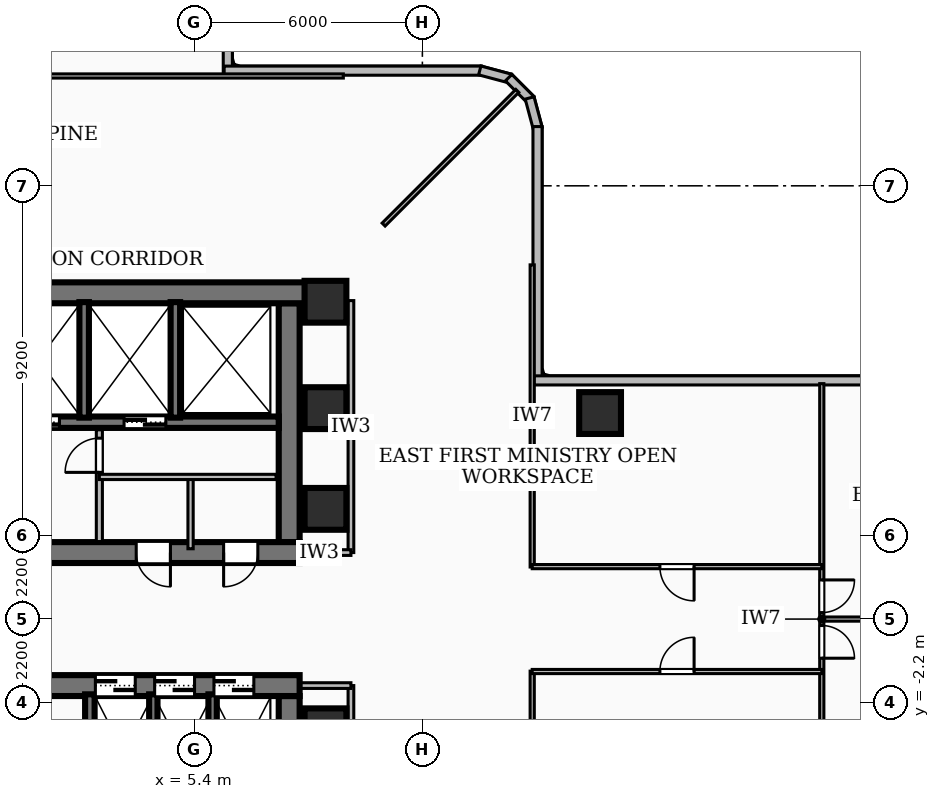
"""IFC4 building model, lengths in metres.
Left out: names, types, materials, properties, quantities, classifications, styles, units other than length and angle.
Written with IfcOpenShell. Run it as: python <this file> out.ifc"""

import sys

from ifc_helpers import new_model, si_unit, direction, frame, frame_2d, origin, origin_2d, place, context, subcontext, project, spatial, rectangle, extrude, element, fill, save


model = new_model("IFC4")
c1 = context("Model", 3, precision=1e-05, world=origin(), true_north=direction((0.0, 1.0)))
c2 = subcontext(c1, "Body", "Model", "MODEL_VIEW")
j1 = project(units=[si_unit("LENGTHUNIT", "METRE"), si_unit("PLANEANGLEUNIT", "RADIAN")], contexts=[c1])
p1 = place(None, origin())
s1 = spatial("IfcSite", under=j1, at=p1, CompositionType="ELEMENT")
p2 = place(p1, origin())
s2 = spatial("IfcBuilding", under=s1, at=p2, CompositionType="ELEMENT")
p3 = place(p2, frame((0.0, 0.0, 28.08)))
s3 = spatial("IfcBuildingStorey", under=s2, at=p3, CompositionType="ELEMENT", Elevation=28.08)
p4 = place(p3, frame((-8.78, 8.585, 0.0), z_axis=(0.0, 0.0, 1.0), x_axis=(1.0, 0.0, 0.0)))
e1 = element("IfcWall", 1, at=p4, inside=s3, PredefinedType="SHEAR", context=c2, shape_type="SweptSolid", body=[
    extrude(rectangle(XDim=17.56, YDim=0.55, at=frame_2d((8.78, 0.0))), origin(), (0.0, 0.0, 1.0), 3.34),
])
p5 = place(p3, frame((8.17, 1.75, 0.0), z_axis=(0.0, 0.0, 1.0), x_axis=(-1.0, 0.0, 0.0)))
e2 = element("IfcWall", 2, at=p5, inside=s3, PredefinedType="SHEAR", context=c2, shape_type="SweptSolid", body=[
    extrude(rectangle(XDim=16.34, YDim=0.55, at=frame_2d((8.17, 0.0))), origin(), (0.0, 0.0, 1.0), 3.34),
])
p6 = place(p5, frame((7.45, 0.0, 0.0)))
e3 = element("IfcOpeningElement", 3, at=p6, cuts=e2, PredefinedType="OPENING", context=c2, shape_type="SweptSolid", body=[
    extrude(rectangle(XDim=1.0, YDim=2.1, at=frame_2d((0.5, 1.05))), frame((0.0, 0.285, 0.0), z_axis=(0.0, -1.0, 0.0), x_axis=(1.0, 0.0, 0.0)), (0.0, 0.0, 1.0), 0.57),
])
p7 = place(p5, frame((3.4, 0.0, 0.0)))
e4 = element("IfcOpeningElement", 4, at=p7, cuts=e2, PredefinedType="OPENING", context=c2, shape_type="SweptSolid", body=[
    extrude(rectangle(XDim=0.9, YDim=2.06, at=frame_2d((0.45, 1.03))), frame((0.0, 0.285, 0.0), z_axis=(0.0, -1.0, 0.0), x_axis=(1.0, 0.0, 0.0)), (0.0, 0.0, 1.0), 0.57),
])
p8 = place(p5, frame((1.1, 0.0, 0.0)))
e5 = element("IfcOpeningElement", 5, at=p8, cuts=e2, PredefinedType="OPENING", context=c2, shape_type="SweptSolid", body=[
    extrude(rectangle(XDim=0.9, YDim=2.06, at=frame_2d((0.45, 1.03))), frame((0.0, 0.285, 0.0), z_axis=(0.0, -1.0, 0.0), x_axis=(1.0, 0.0, 0.0)), (0.0, 0.0, 1.0), 0.57),
])
p9 = place(p3, frame((7.895, 8.31, 0.0), z_axis=(0.0, 0.0, 1.0), x_axis=(0.0, -1.0, 0.0)))
e6 = element("IfcWall", 6, at=p9, inside=s3, PredefinedType="SHEAR", context=c2, shape_type="SweptSolid", body=[
    extrude(rectangle(XDim=6.285, YDim=0.55, at=frame_2d((3.143, 0.0))), origin(), (0.0, 0.0, 1.0), 3.34),
])
p10 = place(p3, frame((7.62, 5.18, 0.0), z_axis=(0.0, 0.0, 1.0), x_axis=(-1.0, 0.0, 0.0)))
e7 = element("IfcWall", 7, at=p10, inside=s3, PredefinedType="SOLIDWALL", context=c2, shape_type="SweptSolid", body=[
    extrude(rectangle(XDim=15.24, YDim=0.3, at=frame_2d((7.62, 0.0))), origin(), (0.0, 0.0, 1.0), 3.34),
])
p11 = place(p10, frame((5.77, 0.0, 0.0)))
e8 = element("IfcOpeningElement", 8, at=p11, cuts=e7, PredefinedType="OPENING", context=c2, shape_type="SweptSolid", body=[
    extrude(rectangle(XDim=1.1, YDim=2.15, at=frame_2d((0.55, 1.075))), frame((0.0, 0.16, 0.0), z_axis=(0.0, -1.0, 0.0), x_axis=(1.0, 0.0, 0.0)), (0.0, 0.0, 1.0), 0.32),
])
p12 = place(p10, frame((2.97, 0.0, 0.0)))
e9 = element("IfcOpeningElement", 9, at=p12, cuts=e7, PredefinedType="OPENING", context=c2, shape_type="SweptSolid", body=[
    extrude(rectangle(XDim=1.1, YDim=2.15, at=frame_2d((0.55, 1.075))), frame((0.0, 0.16, 0.0), z_axis=(0.0, -1.0, 0.0), x_axis=(1.0, 0.0, 0.0)), (0.0, 0.0, 1.0), 0.32),
])
p13 = place(p10, frame((7.97, 0.0, 0.0)))
e10 = element("IfcOpeningElement", 10, at=p13, cuts=e7, PredefinedType="OPENING", context=c2, shape_type="SweptSolid", body=[
    extrude(rectangle(XDim=1.0, YDim=2.1, at=frame_2d((0.5, 1.05))), frame((0.0, 0.16, 0.0), z_axis=(0.0, -1.0, 0.0), x_axis=(1.0, 0.0, 0.0)), (0.0, 0.0, 1.0), 0.32),
])
p14 = place(p3, frame((-8.17, -1.75, 0.0), z_axis=(0.0, 0.0, 1.0), x_axis=(1.0, 0.0, 0.0)))
e11 = element("IfcWall", 11, at=p14, inside=s3, PredefinedType="SHEAR", context=c2, shape_type="SweptSolid", body=[
    extrude(rectangle(XDim=16.34, YDim=0.55, at=frame_2d((8.17, 0.0))), origin(), (0.0, 0.0, 1.0), 3.34),
])
p15 = place(p14, frame((7.45, 0.0, 0.0)))
e12 = element("IfcOpeningElement", 12, at=p15, cuts=e11, PredefinedType="OPENING", context=c2, shape_type="SweptSolid", body=[
    extrude(rectangle(XDim=1.0, YDim=2.1, at=frame_2d((0.5, 1.05))), frame((0.0, 0.285, 0.0), z_axis=(0.0, -1.0, 0.0), x_axis=(1.0, 0.0, 0.0)), (0.0, 0.0, 1.0), 0.57),
])
p16 = place(p14, frame((10.965, 0.0, 0.0)))
e13 = element("IfcOpeningElement", 13, at=p16, cuts=e11, PredefinedType="OPENING", context=c2, shape_type="SweptSolid", body=[
    extrude(rectangle(XDim=1.05, YDim=2.15, at=frame_2d((0.525, 1.075))), frame((0.0, 0.285, 0.0), z_axis=(0.0, -1.0, 0.0), x_axis=(1.0, 0.0, 0.0)), (0.0, 0.0, 1.0), 0.57),
])
p17 = place(p14, frame((12.525, 0.0, 0.0)))
e14 = element("IfcOpeningElement", 14, at=p17, cuts=e11, PredefinedType="OPENING", context=c2, shape_type="SweptSolid", body=[
    extrude(rectangle(XDim=1.05, YDim=2.15, at=frame_2d((0.525, 1.075))), frame((0.0, 0.285, 0.0), z_axis=(0.0, -1.0, 0.0), x_axis=(1.0, 0.0, 0.0)), (0.0, 0.0, 1.0), 0.57),
])
p18 = place(p14, frame((14.085, 0.0, 0.0)))
e15 = element("IfcOpeningElement", 15, at=p18, cuts=e11, PredefinedType="OPENING", context=c2, shape_type="SweptSolid", body=[
    extrude(rectangle(XDim=1.05, YDim=2.15, at=frame_2d((0.525, 1.075))), frame((0.0, 0.285, 0.0), z_axis=(0.0, -1.0, 0.0), x_axis=(1.0, 0.0, 0.0)), (0.0, 0.0, 1.0), 0.57),
])
p19 = place(p3, frame((7.895, -2.025, 0.0), z_axis=(0.0, 0.0, 1.0), x_axis=(0.0, -1.0, 0.0)))
e16 = element("IfcWall", 16, at=p19, inside=s3, PredefinedType="SHEAR", context=c2, shape_type="SweptSolid", body=[
    extrude(rectangle(XDim=6.285, YDim=0.55, at=frame_2d((3.143, 0.0))), origin(), (0.0, 0.0, 1.0), 3.34),
])
for number, where, z_axis, x_axis in (
    (17, (2.5, 5.3, 0.0), (0.0, 0.0, 1.0), (0.0, 1.0, 0.0)),
    (18, (4.9, 5.3, 0.0), (0.0, 0.0, 1.0), (0.0, 1.0, 0.0)),
):
    element("IfcWall", number, at=place(p3, frame(where, z_axis=z_axis, x_axis=x_axis)), inside=s3, PredefinedType="SOLIDWALL", context=c2, shape_type="SweptSolid", body=[
        extrude(rectangle(XDim=3.04, YDim=0.25, at=frame_2d((1.52, 0.0))), origin(), (0.0, 0.0, 1.0), 3.34),
    ])
p20 = place(p3, frame((2.65, -5.05, 0.0), z_axis=(0.0, 0.0, 1.0), x_axis=(0.0, 1.0, 0.0)))
e19 = element("IfcWall", 19, at=p20, inside=s3, PredefinedType="SOLIDWALL", context=c2, shape_type="SweptSolid", body=[
    extrude(rectangle(XDim=3.07, YDim=0.25, at=frame_2d((1.535, 0.0))), origin(), (0.0, 0.0, 1.0), 3.34),
])
for number, where, z_axis, x_axis in (
    (20, (4.32, -5.05, 0.0), (0.0, 0.0, 1.0), (0.0, 1.0, 0.0)),
    (21, (5.88, -5.05, 0.0), (0.0, 0.0, 1.0), (0.0, 1.0, 0.0)),
):
    element("IfcWall", number, at=place(p3, frame(where, z_axis=z_axis, x_axis=x_axis)), inside=s3, PredefinedType="SOLIDWALL", context=c2, shape_type="SweptSolid", body=[
        extrude(rectangle(XDim=3.07, YDim=0.22, at=frame_2d((1.535, 0.0))), origin(), (0.0, 0.0, 1.0), 3.34),
    ])
for number, where, z_axis, x_axis in (
    (22, (8.85, -2.9, 0.0), (0.0, 0.0, 1.0), (1.0, 0.0, 0.0)),
    (23, (8.85, 2.9, 0.0), (0.0, 0.0, 1.0), (1.0, 0.0, 0.0)),
    (24, (8.85, 5.55, 0.0), (0.0, 0.0, 1.0), (1.0, 0.0, 0.0)),
    (25, (8.85, 8.35, 0.0), (0.0, 0.0, 1.0), (1.0, 0.0, 0.0)),
    (26, (16.076, 5.421, 0.0), (0.0, 0.0, 1.0), (1.0, 0.0, 0.0)),
):
    element("IfcColumn", number, at=place(p3, frame(where, z_axis=z_axis, x_axis=x_axis)), inside=s3, PredefinedType="COLUMN", context=c2, shape_type="SweptSolid", body=[
        extrude(rectangle(XDim=1.1, YDim=1.1, at=origin_2d()), origin(), (0.0, 0.0, 1.0), 3.6),
    ])
p21 = place(p3, frame((6.28, 27.809, 0.0), z_axis=(0.0, 0.0, 1.0), x_axis=(0.0, -1.0, 0.0)))
e27 = element("IfcWall", 27, at=p21, inside=s3, PredefinedType="SOLIDWALL", context=c2, shape_type="SweptSolid", body=[
    extrude(rectangle(XDim=13.475, YDim=0.24, at=frame_2d((6.738, 0.0))), origin(), (0.0, 0.0, 1.0), 3.34),
])
p22 = place(p21, frame((1.1, 0.0, 0.85)))
e28 = element("IfcOpeningElement", 28, at=p22, cuts=e27, PredefinedType="OPENING", context=c2, shape_type="SweptSolid", body=[
    extrude(rectangle(XDim=2.4, YDim=1.85, at=frame_2d((1.2, 0.925))), frame((0.0, 0.13, 0.0), z_axis=(0.0, -1.0, 0.0), x_axis=(1.0, 0.0, 0.0)), (0.0, 0.0, 1.0), 0.26),
])
p23 = place(p3, frame((6.184, 14.43, 0.0), z_axis=(0.0, 0.0, 1.0), x_axis=(1.0, 0.0, 0.0)))
e29 = element("IfcWall", 29, at=p23, inside=s3, PredefinedType="SOLIDWALL", context=c2, shape_type="SweptSolid", body=[
    extrude(rectangle(XDim=6.775, YDim=0.24, at=frame_2d((3.387, 0.0))), origin(), (0.0, 0.0, 1.0), 3.34),
])
p24 = place(p3, frame((12.91, 14.436, 0.0), z_axis=(0.0, 0.0, 1.0), x_axis=(0.966161677396, -0.257937227116, 0.0)))
e30 = element("IfcWall", 30, at=p24, inside=s3, PredefinedType="SOLIDWALL", context=c2, shape_type="SweptSolid", body=[
    extrude(rectangle(XDim=0.83, YDim=0.24, at=frame_2d((0.415, 0.0))), origin(), (0.0, 0.0, 1.0), 3.34),
])
p25 = place(p3, frame((13.67, 14.246, 0.0), z_axis=(0.0, 0.0, 1.0), x_axis=(0.707106781187, -0.707106781187, 0.0)))
e31 = element("IfcWall", 31, at=p25, inside=s3, PredefinedType="SOLIDWALL", context=c2, shape_type="SweptSolid", body=[
    extrude(rectangle(XDim=0.815, YDim=0.24, at=frame_2d((0.407, 0.0))), origin(), (0.0, 0.0, 1.0), 3.34),
])
p26 = place(p3, frame((14.222, 13.712, 0.0), z_axis=(0.0, 0.0, 1.0), x_axis=(0.257937227116, -0.966161677396, 0.0)))
e32 = element("IfcWall", 32, at=p26, inside=s3, PredefinedType="SOLIDWALL", context=c2, shape_type="SweptSolid", body=[
    extrude(rectangle(XDim=0.83, YDim=0.24, at=frame_2d((0.415, 0.0))), origin(), (0.0, 0.0, 1.0), 3.34),
])
p27 = place(p3, frame((14.43, 12.959, 0.0), z_axis=(0.0, 0.0, 1.0), x_axis=(0.0, -1.0, 0.0)))
e33 = element("IfcWall", 33, at=p27, inside=s3, PredefinedType="SOLIDWALL", context=c2, shape_type="SweptSolid", body=[
    extrude(rectangle(XDim=6.775, YDim=0.24, at=frame_2d((3.387, 0.0))), origin(), (0.0, 0.0, 1.0), 3.34),
])
p28 = place(p3, frame((14.334, 6.28, 0.0), z_axis=(0.0, 0.0, 1.0), x_axis=(1.0, 0.0, 0.0)))
e34 = element("IfcWall", 34, at=p28, inside=s3, PredefinedType="SOLIDWALL", context=c2, shape_type="SweptSolid", body=[
    extrude(rectangle(XDim=16.875, YDim=0.24, at=frame_2d((8.438, 0.0))), origin(), (0.0, 0.0, 1.0), 3.34),
])
p29 = place(p28, frame((13.375, 0.0, 0.85)))
e35 = element("IfcOpeningElement", 35, at=p29, cuts=e34, PredefinedType="OPENING", context=c2, shape_type="SweptSolid", body=[
    extrude(rectangle(XDim=2.4, YDim=2.1, at=frame_2d((1.2, 1.05))), frame((0.0, 0.13, 0.0), z_axis=(0.0, -1.0, 0.0), x_axis=(1.0, 0.0, 0.0)), (0.0, 0.0, 1.0), 0.26),
])
p30 = place(p3, frame((2.9, 2.04, 0.0), z_axis=(0.0, 0.0, 1.0), x_axis=(0.0, 1.0, 0.0)))
e36 = element("IfcWall", 36, at=p30, inside=s3, PredefinedType="PARTITIONING", context=c2, shape_type="SweptSolid", body=[
    extrude(rectangle(XDim=2.94, YDim=0.16, at=frame_2d((1.47, 0.0))), origin(), (0.0, 0.0, 1.0), 2.405),
])
p31 = place(p30, frame((1.82, 0.0, 0.0)))
e37 = element("IfcOpeningElement", 37, at=p31, cuts=e36, PredefinedType="OPENING", context=c2, shape_type="SweptSolid", body=[
    extrude(rectangle(XDim=0.9, YDim=2.06, at=frame_2d((0.45, 1.03))), frame((0.0, 0.09, 0.0), z_axis=(0.0, -1.0, 0.0), x_axis=(1.0, 0.0, 0.0)), (0.0, 0.0, 1.0), 0.18),
])
p32 = place(p3, frame((2.9, 3.74, 0.0), z_axis=(0.0, 0.0, 1.0), x_axis=(1.0, 0.0, 0.0)))
e38 = element("IfcWall", 38, at=p32, inside=s3, PredefinedType="PARTITIONING", context=c2, shape_type="SweptSolid", body=[
    extrude(rectangle(XDim=4.65, YDim=0.138, at=frame_2d((2.325, 0.0))), origin(), (0.0, 0.0, 1.0), 3.34),
])
p33 = place(p3, frame((5.3, 1.85, 0.0), z_axis=(0.0, 0.0, 1.0), x_axis=(0.0, 1.0, 0.0)))
e39 = element("IfcWall", 39, at=p33, inside=s3, PredefinedType="PARTITIONING", context=c2, shape_type="SweptSolid", body=[
    extrude(rectangle(XDim=1.89, YDim=0.138, at=frame_2d((0.945, 0.0))), origin(), (0.0, 0.0, 1.0), 2.405),
])
p34 = place(p3, frame((9.52, 1.75, 0.0), z_axis=(0.0, 0.0, 1.0), x_axis=(0.0, 1.0, 0.0)))
e40 = element("IfcWall", 40, at=p34, inside=s3, PredefinedType="PARTITIONING", context=c2, shape_type="SweptSolid", body=[
    extrude(rectangle(XDim=6.63, YDim=0.15, at=frame_2d((3.315, 0.0))), origin(), (0.0, 0.0, 1.0), 2.421),
])
p35 = place(p3, frame((7.85, 1.75, 0.0), z_axis=(0.0, 0.0, 1.0), x_axis=(1.0, 0.0, 0.0)))
e41 = element("IfcWall", 41, at=p35, inside=s3, PredefinedType="PARTITIONING", context=c2, shape_type="SweptSolid", body=[
    extrude(rectangle(XDim=1.67, YDim=0.15, at=frame_2d((0.835, 0.0))), origin(), (0.0, 0.0, 1.0), 2.405),
])
p36 = place(p3, frame((9.52, -8.38, 0.0), z_axis=(0.0, 0.0, 1.0), x_axis=(0.0, 1.0, 0.0)))
e42 = element("IfcWall", 42, at=p36, inside=s3, PredefinedType="PARTITIONING", context=c2, shape_type="SweptSolid", body=[
    extrude(rectangle(XDim=6.63, YDim=0.15, at=frame_2d((3.315, 0.0))), origin(), (0.0, 0.0, 1.0), 2.421),
])
p37 = place(p3, frame((7.85, -1.75, 0.0), z_axis=(0.0, 0.0, 1.0), x_axis=(1.0, 0.0, 0.0)))
e43 = element("IfcWall", 43, at=p37, inside=s3, PredefinedType="PARTITIONING", context=c2, shape_type="SweptSolid", body=[
    extrude(rectangle(XDim=1.67, YDim=0.15, at=frame_2d((0.835, 0.0))), origin(), (0.0, 0.0, 1.0), 2.405),
])
p38 = place(p3, frame((10.38, 10.38, 0.0), z_axis=(0.0, 0.0, 1.0), x_axis=(0.707106781187, 0.707106781187, 0.0)))
e44 = element("IfcWall", 44, at=p38, inside=s3, PredefinedType="PARTITIONING", context=c2, shape_type="SweptSolid", body=[
    extrude(rectangle(XDim=4.975, YDim=0.11, at=frame_2d((2.488, 0.0))), origin(), (0.0, 0.0, 1.0), 3.34),
])
for number, where, z_axis, x_axis in (
    (45, (14.29, 1.37, 0.0), (0.0, 0.0, 1.0), (0.0, 1.0, 0.0)),
    (46, (14.29, -9.32, 0.0), (0.0, 0.0, 1.0), (0.0, 1.0, 0.0)),
):
    element("IfcWall", number, at=place(p3, frame(where, z_axis=z_axis, x_axis=x_axis)), inside=s3, PredefinedType="PARTITIONING", context=c2, shape_type="SweptSolid", body=[
        extrude(rectangle(XDim=7.95, YDim=0.11, at=frame_2d((3.975, 0.0))), origin(), (0.0, 0.0, 1.0), 2.421),
    ])
p39 = place(p3, frame((21.91, 1.38, 0.0), z_axis=(0.0, 0.0, 1.0), x_axis=(-1.0, 0.0, 0.0)))
e47 = element("IfcWall", 47, at=p39, inside=s3, PredefinedType="PARTITIONING", context=c2, shape_type="SweptSolid", body=[
    extrude(rectangle(XDim=7.62, YDim=0.11, at=frame_2d((3.81, 0.0))), origin(), (0.0, 0.0, 1.0), 2.869),
])
p40 = place(p39, frame((3.36, 0.0, 0.0)))
e48 = element("IfcOpeningElement", 48, at=p40, cuts=e47, PredefinedType="OPENING", context=c2, shape_type="SweptSolid", body=[
    extrude(rectangle(XDim=0.9, YDim=2.06, at=frame_2d((0.45, 1.03))), frame((0.0, 0.065, 0.0), z_axis=(0.0, -1.0, 0.0), x_axis=(1.0, 0.0, 0.0)), (0.0, 0.0, 1.0), 0.13),
])
p41 = place(p3, frame((14.29, -1.38, 0.0), z_axis=(0.0, 0.0, 1.0), x_axis=(1.0, 0.0, 0.0)))
e49 = element("IfcWall", 49, at=p41, inside=s3, PredefinedType="PARTITIONING", context=c2, shape_type="SweptSolid", body=[
    extrude(rectangle(XDim=7.62, YDim=0.11, at=frame_2d((3.81, 0.0))), origin(), (0.0, 0.0, 1.0), 2.869),
])
p42 = place(p41, frame((3.36, 0.0, 0.0)))
e50 = element("IfcOpeningElement", 50, at=p42, cuts=e49, PredefinedType="OPENING", context=c2, shape_type="SweptSolid", body=[
    extrude(rectangle(XDim=0.9, YDim=2.06, at=frame_2d((0.45, 1.03))), frame((0.0, 0.065, 0.0), z_axis=(0.0, -1.0, 0.0), x_axis=(1.0, 0.0, 0.0)), (0.0, 0.0, 1.0), 0.13),
])
p43 = place(p3, frame((21.97, 0.0, 0.0), z_axis=(0.0, 0.0, 1.0), x_axis=(1.0, 0.0, 0.0)))
e51 = element("IfcWall", 51, at=p43, inside=s3, PredefinedType="PARTITIONING", context=c2, shape_type="SweptSolid", body=[
    extrude(rectangle(XDim=10.625, YDim=0.11, at=frame_2d((5.312, 0.0))), origin(), (0.0, 0.0, 1.0), 2.72),
])
p44 = place(p3, frame((21.91, 6.195, 0.0), z_axis=(0.0, 0.0, 1.0), x_axis=(0.0, -1.0, 0.0)))
e52 = element("IfcWall", 52, at=p44, inside=s3, PredefinedType="PARTITIONING", context=c2, shape_type="SweptSolid", body=[
    extrude(rectangle(XDim=12.39, YDim=0.11, at=frame_2d((6.195, 0.0))), origin(), (0.0, 0.0, 1.0), 2.421),
])
p45 = place(p44, frame((6.365, 0.0, 0.0)))
e53 = element("IfcOpeningElement", 53, at=p45, cuts=e52, PredefinedType="OPENING", context=c2, shape_type="SweptSolid", body=[
    extrude(rectangle(XDim=0.86, YDim=2.04, at=frame_2d((0.43, 1.02))), frame((0.0, 0.065, 0.0), z_axis=(0.0, -1.0, 0.0), x_axis=(1.0, 0.0, 0.0)), (0.0, 0.0, 1.0), 0.13),
])
p46 = place(p44, frame((5.165, 0.0, 0.0)))
e54 = element("IfcOpeningElement", 54, at=p46, cuts=e52, PredefinedType="OPENING", context=c2, shape_type="SweptSolid", body=[
    extrude(rectangle(XDim=0.86, YDim=2.04, at=frame_2d((0.43, 1.02))), frame((0.0, 0.065, 0.0), z_axis=(0.0, -1.0, 0.0), x_axis=(1.0, 0.0, 0.0)), (0.0, 0.0, 1.0), 0.13),
])
p47 = place(p3, frame((9.32, 14.29, 0.0), z_axis=(0.0, 0.0, 1.0), x_axis=(-1.0, 0.0, 0.0)))
e55 = element("IfcWall", 55, at=p47, inside=s3, PredefinedType="PARTITIONING", context=c2, shape_type="SweptSolid", body=[
    extrude(rectangle(XDim=7.95, YDim=0.11, at=frame_2d((3.975, 0.0))), origin(), (0.0, 0.0, 1.0), 2.421),
])
p48 = place(p11, origin())
e56 = element("IfcDoor", 56, at=p48, inside=s3, OperationType="DOUBLE_DOOR_SLIDING", PredefinedType="DOOR", context=c2, shape_type="SweptSolid", body=[
    extrude(rectangle(XDim=1.1, YDim=2.15, at=frame_2d((0.55, 1.075))), frame((0.0, 0.025, 0.0), z_axis=(0.0, -1.0, 0.0), x_axis=(1.0, 0.0, 0.0)), (0.0, 0.0, 1.0), 0.05),
])
fill(e8, e56)
p49 = place(p12, origin())
e57 = element("IfcDoor", 57, at=p49, inside=s3, OperationType="DOUBLE_DOOR_SLIDING", PredefinedType="DOOR", context=c2, shape_type="SweptSolid", body=[
    extrude(rectangle(XDim=1.1, YDim=2.15, at=frame_2d((0.55, 1.075))), frame((0.0, 0.025, 0.0), z_axis=(0.0, -1.0, 0.0), x_axis=(1.0, 0.0, 0.0)), (0.0, 0.0, 1.0), 0.05),
])
fill(e9, e57)
p50 = place(p16, origin())
e58 = element("IfcDoor", 58, at=p50, inside=s3, OperationType="DOUBLE_DOOR_SLIDING", PredefinedType="DOOR", context=c2, shape_type="SweptSolid", body=[
    extrude(rectangle(XDim=1.05, YDim=2.15, at=frame_2d((0.525, 1.075))), frame((0.0, 0.025, 0.0), z_axis=(0.0, -1.0, 0.0), x_axis=(1.0, 0.0, 0.0)), (0.0, 0.0, 1.0), 0.05),
])
fill(e13, e58)
p51 = place(p17, origin())
e59 = element("IfcDoor", 59, at=p51, inside=s3, OperationType="DOUBLE_DOOR_SLIDING", PredefinedType="DOOR", context=c2, shape_type="SweptSolid", body=[
    extrude(rectangle(XDim=1.05, YDim=2.15, at=frame_2d((0.525, 1.075))), frame((0.0, 0.025, 0.0), z_axis=(0.0, -1.0, 0.0), x_axis=(1.0, 0.0, 0.0)), (0.0, 0.0, 1.0), 0.05),
])
fill(e14, e59)
p52 = place(p18, origin())
e60 = element("IfcDoor", 60, at=p52, inside=s3, OperationType="DOUBLE_DOOR_SLIDING", PredefinedType="DOOR", context=c2, shape_type="SweptSolid", body=[
    extrude(rectangle(XDim=1.05, YDim=2.15, at=frame_2d((0.525, 1.075))), frame((0.0, 0.025, 0.0), z_axis=(0.0, -1.0, 0.0), x_axis=(1.0, 0.0, 0.0)), (0.0, 0.0, 1.0), 0.05),
])
fill(e15, e60)
p53 = place(p7, origin())
e61 = element("IfcDoor", 61, at=p53, inside=s3, OperationType="SINGLE_SWING_LEFT", PredefinedType="DOOR", context=c2, shape_type="SweptSolid", body=[
    extrude(rectangle(XDim=0.9, YDim=2.06, at=frame_2d((0.45, 1.03))), frame((0.0, 0.025, 0.0), z_axis=(0.0, -1.0, 0.0), x_axis=(1.0, 0.0, 0.0)), (0.0, 0.0, 1.0), 0.05),
])
fill(e4, e61)
p54 = place(p8, origin())
e62 = element("IfcDoor", 62, at=p54, inside=s3, OperationType="SINGLE_SWING_RIGHT", PredefinedType="DOOR", context=c2, shape_type="SweptSolid", body=[
    extrude(rectangle(XDim=0.9, YDim=2.06, at=frame_2d((0.45, 1.03))), frame((0.0, 0.025, 0.0), z_axis=(0.0, -1.0, 0.0), x_axis=(1.0, 0.0, 0.0)), (0.0, 0.0, 1.0), 0.05),
])
fill(e5, e62)
p55 = place(p31, origin())
e63 = element("IfcDoor", 63, at=p55, inside=s3, OperationType="SINGLE_SWING_LEFT", PredefinedType="DOOR", context=c2, shape_type="SweptSolid", body=[
    extrude(rectangle(XDim=0.9, YDim=2.06, at=frame_2d((0.45, 1.03))), frame((0.0, 0.025, 0.0), z_axis=(0.0, -1.0, 0.0), x_axis=(1.0, 0.0, 0.0)), (0.0, 0.0, 1.0), 0.05),
])
fill(e37, e63)
p56 = place(p40, origin())
e64 = element("IfcDoor", 64, at=p56, inside=s3, OperationType="SINGLE_SWING_LEFT", PredefinedType="DOOR", context=c2, shape_type="SweptSolid", body=[
    extrude(rectangle(XDim=0.9, YDim=2.06, at=frame_2d((0.45, 1.03))), frame((0.0, 0.025, 0.0), z_axis=(0.0, -1.0, 0.0), x_axis=(1.0, 0.0, 0.0)), (0.0, 0.0, 1.0), 0.05),
])
fill(e48, e64)
p57 = place(p42, origin())
e65 = element("IfcDoor", 65, at=p57, inside=s3, OperationType="SINGLE_SWING_RIGHT", PredefinedType="DOOR", context=c2, shape_type="SweptSolid", body=[
    extrude(rectangle(XDim=0.9, YDim=2.06, at=frame_2d((0.45, 1.03))), frame((0.0, 0.025, 0.0), z_axis=(0.0, -1.0, 0.0), x_axis=(1.0, 0.0, 0.0)), (0.0, 0.0, 1.0), 0.05),
])
fill(e50, e65)
p58 = place(p45, origin())
e66 = element("IfcDoor", 66, at=p58, inside=s3, OperationType="SINGLE_SWING_RIGHT", PredefinedType="DOOR", context=c2, shape_type="SweptSolid", body=[
    extrude(rectangle(XDim=0.86, YDim=2.04, at=frame_2d((0.43, 1.02))), frame((0.0, 0.025, 0.0), z_axis=(0.0, -1.0, 0.0), x_axis=(1.0, 0.0, 0.0)), (0.0, 0.0, 1.0), 0.05),
])
fill(e53, e66)
p59 = place(p46, origin())
e67 = element("IfcDoor", 67, at=p59, inside=s3, OperationType="SINGLE_SWING_LEFT", PredefinedType="DOOR", context=c2, shape_type="SweptSolid", body=[
    extrude(rectangle(XDim=0.86, YDim=2.04, at=frame_2d((0.43, 1.02))), frame((0.0, 0.025, 0.0), z_axis=(0.0, -1.0, 0.0), x_axis=(1.0, 0.0, 0.0)), (0.0, 0.0, 1.0), 0.05),
])
fill(e54, e67)
save(model, sys.argv[1])
